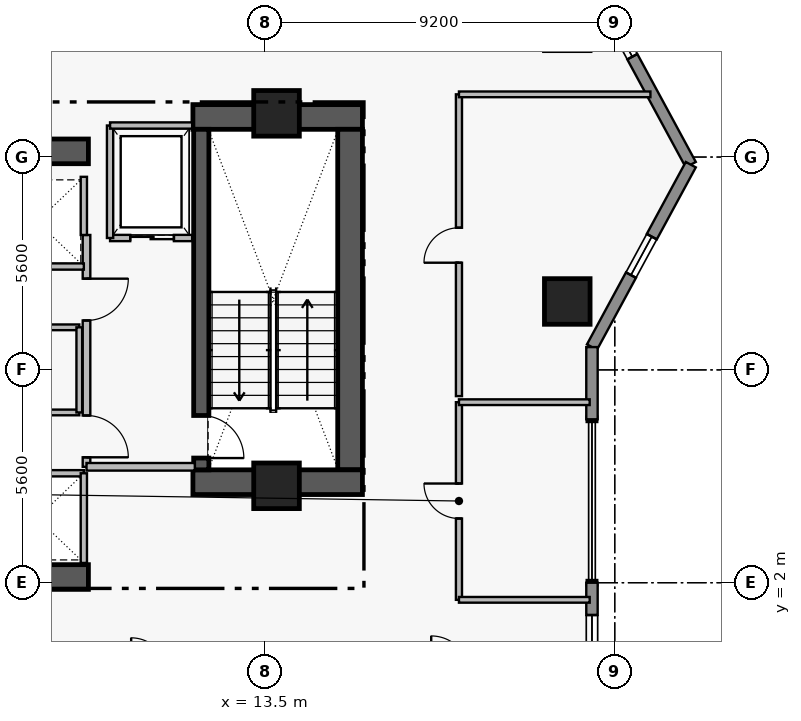
"""IFC4 building model, lengths in metres.
Left out: names, types, materials, properties, quantities, classifications, styles, units other than length and angle.
Written with IfcOpenShell. Run it as: python <this file> out.ifc"""

import sys

from ifc_helpers import new_model, si_unit, direction, frame, frame_2d, origin, origin_2d, place, context, subcontext, project, spatial, rectangle, extrude, element, fill, save


model = new_model("IFC4")
c1 = context("Model", 3, precision=1e-05, world=origin(), true_north=direction((0.0, 1.0)))
c2 = subcontext(c1, "Body", "Model", "MODEL_VIEW")
j1 = project(units=[si_unit("LENGTHUNIT", "METRE"), si_unit("PLANEANGLEUNIT", "RADIAN")], contexts=[c1])
p1 = place(None, origin())
s1 = spatial("IfcSite", under=j1, at=p1, CompositionType="ELEMENT")
p2 = place(p1, origin())
s2 = spatial("IfcBuilding", under=s1, at=p2, CompositionType="ELEMENT")
p3 = place(p2, frame((0.0, 0.0, 192.4)))
s3 = spatial("IfcBuildingStorey", under=s2, at=p3, CompositionType="ELEMENT", Elevation=192.4)
p4 = place(p3, frame((11.6, 14.255, 0.0), z_axis=(0.0, 0.0, 1.0), x_axis=(1.0, 0.0, 0.0)))
e1 = element("IfcWall", 1, at=p4, inside=s3, PredefinedType="SHEAR", context=c2, shape_type="SweptSolid", body=[
    extrude(rectangle(XDim=4.46, YDim=0.65, at=frame_2d((2.23, 0.0))), origin(), (0.0, 0.0, 1.0), 3.56),
])
p5 = place(p3, frame((15.735, 4.97, 0.0), z_axis=(0.0, 0.0, 1.0), x_axis=(0.0, 1.0, 0.0)))
e2 = element("IfcWall", 2, at=p5, inside=s3, PredefinedType="SHEAR", context=c2, shape_type="SweptSolid", body=[
    extrude(rectangle(XDim=8.96, YDim=0.65, at=frame_2d((4.48, 0.0))), origin(), (0.0, 0.0, 1.0), 3.56),
])
p6 = place(p3, frame((11.6, 4.645, 0.0), z_axis=(0.0, 0.0, 1.0), x_axis=(1.0, 0.0, 0.0)))
e3 = element("IfcWall", 3, at=p6, inside=s3, PredefinedType="SHEAR", context=c2, shape_type="SweptSolid", body=[
    extrude(rectangle(XDim=4.46, YDim=0.65, at=frame_2d((2.23, 0.0))), origin(), (0.0, 0.0, 1.0), 3.56),
])
for number, where, z_axis, x_axis in (
    (4, (1.25, 2.15, 0.0), (0.0, 0.0, 1.0), (1.0, 0.0, 0.0)),
    (5, (1.25, 13.35, 0.0), (0.0, 0.0, 1.0), (1.0, 0.0, 0.0)),
):
    element("IfcWall", number, at=place(p3, frame(where, z_axis=z_axis, x_axis=x_axis)), inside=s3, PredefinedType="SHEAR", context=c2, shape_type="SweptSolid", body=[
        extrude(rectangle(XDim=7.6, YDim=0.65, at=frame_2d((3.8, 0.0))), origin(), (0.0, 0.0, 1.0), 3.53),
    ])
p7 = place(p3, frame((11.82, 13.93, 0.0), z_axis=(0.0, 0.0, 1.0), x_axis=(0.0, -1.0, 0.0)))
e6 = element("IfcWall", 6, at=p7, inside=s3, PredefinedType="SHEAR", context=c2, shape_type="SweptSolid", body=[
    extrude(rectangle(XDim=8.96, YDim=0.4, at=frame_2d((4.48, 0.0))), origin(), (0.0, 0.0, 1.0), 3.56),
])
p8 = place(p7, frame((7.53, 0.0, 0.0)))
e7 = element("IfcOpeningElement", 7, at=p8, cuts=e6, PredefinedType="OPENING", context=c2, shape_type="SweptSolid", body=[
    extrude(rectangle(XDim=1.12, YDim=2.22, at=frame_2d((0.56, 1.11))), frame((0.0, 0.21, 0.0), z_axis=(0.0, -1.0, 0.0), x_axis=(1.0, 0.0, 0.0)), (0.0, 0.0, 1.0), 0.42),
])
for number, where, z_axis, x_axis in (
    (8, (13.8, 14.35, 0.0), (0.0, 0.0, 1.0), (1.0, 0.0, 0.0)),
    (9, (13.8, 4.55, 0.0), (0.0, 0.0, 1.0), (1.0, 0.0, 0.0)),
    (10, (21.45, 9.4, 0.0), (0.0, 0.0, 1.0), (1.0, 0.0, 0.0)),
):
    element("IfcColumn", number, at=place(p3, frame(where, z_axis=z_axis, x_axis=x_axis)), inside=s3, PredefinedType="COLUMN", context=c2, shape_type="SweptSolid", body=[
        extrude(rectangle(XDim=1.2, YDim=1.2, at=origin_2d()), origin(), (0.0, 0.0, 1.0), 3.75),
    ])
p9 = place(p3, frame((22.1, 17.8, 0.0), z_axis=(0.0, 0.0, 1.0), x_axis=(0.476258655584, -0.879305233114, 0.0)))
e11 = element("IfcWall", 11, at=p9, inside=s3, PredefinedType="STANDARD", context=c2, shape_type="SweptSolid", body=[
    extrude(rectangle(XDim=5.459, YDim=0.3, at=frame_2d((2.729, 0.0))), origin(), (0.0, 0.0, 1.0), 3.53),
])
p10 = place(p9, frame((1.078, 0.0, 1.25)))
e12 = element("IfcOpeningElement", 12, at=p10, cuts=e11, PredefinedType="OPENING", context=c2, shape_type="SweptSolid", body=[
    extrude(rectangle(XDim=1.15, YDim=1.55, at=frame_2d((0.575, 0.775))), frame((0.0, 0.16, 0.0), z_axis=(0.0, -1.0, 0.0), x_axis=(1.0, 0.0, 0.0)), (0.0, 0.0, 1.0), 0.32),
])
p11 = place(p3, frame((24.7, 13.0, 0.0), z_axis=(0.0, 0.0, 1.0), x_axis=(-0.476258655584, -0.879305233114, 0.0)))
e13 = element("IfcWall", 13, at=p11, inside=s3, PredefinedType="STANDARD", context=c2, shape_type="SweptSolid", body=[
    extrude(rectangle(XDim=5.459, YDim=0.3, at=frame_2d((2.729, 0.0))), origin(), (0.0, 0.0, 1.0), 3.53),
])
p12 = place(p11, frame((2.155, 0.0, 1.25)))
e14 = element("IfcOpeningElement", 14, at=p12, cuts=e13, PredefinedType="OPENING", context=c2, shape_type="SweptSolid", body=[
    extrude(rectangle(XDim=1.15, YDim=1.55, at=frame_2d((0.575, 0.775))), frame((0.0, 0.16, 0.0), z_axis=(0.0, -1.0, 0.0), x_axis=(1.0, 0.0, 0.0)), (0.0, 0.0, 1.0), 0.32),
])
p13 = place(p3, frame((22.1, 8.2, 0.0), z_axis=(0.0, 0.0, 1.0), x_axis=(0.0, -1.0, 0.0)))
e15 = element("IfcWall", 15, at=p13, inside=s3, PredefinedType="STANDARD", context=c2, shape_type="SweptSolid", body=[
    extrude(rectangle(XDim=1.9, YDim=0.3, at=frame_2d((0.95, 0.0))), origin(), (0.0, 0.0, 1.0), 3.53),
])
p14 = place(p3, frame((22.1, 2.0, 0.0), z_axis=(0.0, 0.0, 1.0), x_axis=(0.0, -1.0, 0.0)))
e16 = element("IfcWall", 16, at=p14, inside=s3, PredefinedType="STANDARD", context=c2, shape_type="SweptSolid", body=[
    extrude(rectangle(XDim=2.85, YDim=0.3, at=frame_2d((1.425, 0.0))), origin(), (0.0, 0.0, 1.0), 3.53),
])
p15 = place(p14, frame((0.85, 0.0, 0.95)))
e17 = element("IfcOpeningElement", 17, at=p15, cuts=e16, PredefinedType="OPENING", context=c2, shape_type="SweptSolid", body=[
    extrude(rectangle(XDim=1.15, YDim=1.55, at=frame_2d((0.575, 0.775))), frame((0.0, 0.16, 0.0), z_axis=(0.0, -1.0, 0.0), x_axis=(1.0, 0.0, 0.0)), (0.0, 0.0, 1.0), 0.32),
])
p16 = place(p3, frame((8.8, 11.15, 0.0), z_axis=(0.0, 0.0, 1.0), x_axis=(0.0, -1.0, 0.0)))
e18 = element("IfcWall", 18, at=p16, inside=s3, PredefinedType="PARTITIONING", context=c2, shape_type="SweptSolid", body=[
    extrude(rectangle(XDim=6.1, YDim=0.2, at=frame_2d((3.05, 0.0))), origin(), (0.0, 0.0, 1.0), 3.53),
])
p17 = place(p16, frame((1.15, 0.0, 0.0)))
e19 = element("IfcOpeningElement", 19, at=p17, cuts=e18, PredefinedType="OPENING", context=c2, shape_type="SweptSolid", body=[
    extrude(rectangle(XDim=1.1, YDim=2.2, at=frame_2d((0.55, 1.1))), frame((0.0, 0.11, 0.0), z_axis=(0.0, -1.0, 0.0), x_axis=(1.0, 0.0, 0.0)), (0.0, 0.0, 1.0), 0.22),
])
p18 = place(p16, frame((4.75, 0.0, 0.0)))
e20 = element("IfcOpeningElement", 20, at=p18, cuts=e18, PredefinedType="OPENING", context=c2, shape_type="SweptSolid", body=[
    extrude(rectangle(XDim=1.1, YDim=2.2, at=frame_2d((0.55, 1.1))), frame((0.0, 0.11, 0.0), z_axis=(0.0, -1.0, 0.0), x_axis=(1.0, 0.0, 0.0)), (0.0, 0.0, 1.0), 0.22),
])
p19 = place(p3, frame((9.42, 11.07, 0.0), z_axis=(0.0, 0.0, 1.0), x_axis=(1.0, 0.0, 0.0)))
e21 = element("IfcWall", 21, at=p19, inside=s3, PredefinedType="PARTITIONING", context=c2, shape_type="SweptSolid", body=[
    extrude(rectangle(XDim=2.16, YDim=0.165, at=frame_2d((1.08, 0.0))), origin(), (0.0, 0.0, 1.0), 3.53),
])
p20 = place(p19, frame((0.53, 0.0, 0.0)))
e22 = element("IfcOpeningElement", 22, at=p20, cuts=e21, PredefinedType="OPENING", context=c2, shape_type="SweptSolid", body=[
    extrude(rectangle(XDim=1.15, YDim=2.25, at=frame_2d((0.575, 1.125))), frame((0.0, 0.093, 0.0), z_axis=(0.0, -1.0, 0.0), x_axis=(1.0, 0.0, 0.0)), (0.0, 0.0, 1.0), 0.185),
])
p21 = place(p3, frame((6.14, 8.72, 0.0), z_axis=(0.0, 0.0, 1.0), x_axis=(1.0, 0.0, 0.0)))
e23 = element("IfcWall", 23, at=p21, inside=s3, PredefinedType="PARTITIONING", context=c2, shape_type="SweptSolid", body=[
    extrude(rectangle(XDim=2.47, YDim=0.15, at=frame_2d((1.235, 0.0))), origin(), (0.0, 0.0, 1.0), 3.53),
])
p22 = place(p21, frame((0.785, 0.0, 0.0)))
e24 = element("IfcOpeningElement", 24, at=p22, cuts=e23, PredefinedType="OPENING", context=c2, shape_type="SweptSolid", body=[
    extrude(rectangle(XDim=0.9, YDim=2.15, at=frame_2d((0.45, 1.075))), frame((0.0, 0.085, 0.0), z_axis=(0.0, -1.0, 0.0), x_axis=(1.0, 0.0, 0.0)), (0.0, 0.0, 1.0), 0.17),
])
p23 = place(p3, frame((18.6, 1.55, 0.0), z_axis=(0.0, 0.0, 1.0), x_axis=(0.0, 1.0, 0.0)))
e25 = element("IfcWall", 25, at=p23, inside=s3, PredefinedType="PARTITIONING", context=c2, shape_type="SweptSolid", body=[
    extrude(rectangle(XDim=5.2, YDim=0.16, at=frame_2d((2.6, 0.0))), origin(), (0.0, 0.0, 1.0), 3.53),
])
p24 = place(p23, frame((2.14, 0.0, 0.0)))
e26 = element("IfcOpeningElement", 26, at=p24, cuts=e25, PredefinedType="OPENING", context=c2, shape_type="SweptSolid", body=[
    extrude(rectangle(XDim=0.92, YDim=2.12, at=frame_2d((0.46, 1.06))), frame((0.0, 0.09, 0.0), z_axis=(0.0, -1.0, 0.0), x_axis=(1.0, 0.0, 0.0)), (0.0, 0.0, 1.0), 0.18),
])
p25 = place(p3, frame((18.6, 6.91, 0.0), z_axis=(0.0, 0.0, 1.0), x_axis=(0.0, 1.0, 0.0)))
e27 = element("IfcWall", 27, at=p25, inside=s3, PredefinedType="PARTITIONING", context=c2, shape_type="SweptSolid", body=[
    extrude(rectangle(XDim=7.94, YDim=0.16, at=frame_2d((3.97, 0.0))), origin(), (0.0, 0.0, 1.0), 3.53),
])
p26 = place(p25, frame((3.51, 0.0, 0.0)))
e28 = element("IfcOpeningElement", 28, at=p26, cuts=e27, PredefinedType="OPENING", context=c2, shape_type="SweptSolid", body=[
    extrude(rectangle(XDim=0.92, YDim=2.12, at=frame_2d((0.46, 1.06))), frame((0.0, 0.09, 0.0), z_axis=(0.0, -1.0, 0.0), x_axis=(1.0, 0.0, 0.0)), (0.0, 0.0, 1.0), 0.18),
])
p27 = place(p3, frame((8.8, 5.05, 0.0), z_axis=(0.0, 0.0, 1.0), x_axis=(1.0, 0.0, 0.0)))
e29 = element("IfcWall", 29, at=p27, inside=s3, PredefinedType="PARTITIONING", context=c2, shape_type="SweptSolid", body=[
    extrude(rectangle(XDim=2.85, YDim=0.2, at=frame_2d((1.425, 0.0))), origin(), (0.0, 0.0, 1.0), 3.53),
])
p28 = place(p3, frame((9.42, 11.07, 0.0), z_axis=(0.0, 0.0, 1.0), x_axis=(0.0, 1.0, 0.0)))
e30 = element("IfcWall", 30, at=p28, inside=s3, PredefinedType="PARTITIONING", context=c2, shape_type="SweptSolid", body=[
    extrude(rectangle(XDim=2.96, YDim=0.165, at=frame_2d((1.48, 0.0))), origin(), (0.0, 0.0, 1.0), 3.53),
])
p29 = place(p3, frame((9.42, 14.03, 0.0), z_axis=(0.0, 0.0, 1.0), x_axis=(1.0, 0.0, 0.0)))
e31 = element("IfcWall", 31, at=p29, inside=s3, PredefinedType="PARTITIONING", context=c2, shape_type="SweptSolid", body=[
    extrude(rectangle(XDim=2.16, YDim=0.165, at=frame_2d((1.08, 0.0))), origin(), (0.0, 0.0, 1.0), 3.53),
])
p30 = place(p3, frame((6.25, 4.88, 0.0), z_axis=(0.0, 0.0, 1.0), x_axis=(1.0, 0.0, 0.0)))
e32 = element("IfcWall", 32, at=p30, inside=s3, PredefinedType="PARTITIONING", context=c2, shape_type="SweptSolid", body=[
    extrude(rectangle(XDim=2.48, YDim=0.165, at=frame_2d((1.24, 0.0))), origin(), (0.0, 0.0, 1.0), 3.53),
])
p31 = place(p3, frame((8.73, 2.52, 0.0), z_axis=(0.0, 0.0, 1.0), x_axis=(0.0, 1.0, 0.0)))
e33 = element("IfcWall", 33, at=p31, inside=s3, PredefinedType="PARTITIONING", context=c2, shape_type="SweptSolid", body=[
    extrude(rectangle(XDim=2.36, YDim=0.165, at=frame_2d((1.18, 0.0))), origin(), (0.0, 0.0, 1.0), 3.53),
])
p32 = place(p3, frame((6.25, 10.32, 0.0), z_axis=(0.0, 0.0, 1.0), x_axis=(1.0, 0.0, 0.0)))
e34 = element("IfcWall", 34, at=p32, inside=s3, PredefinedType="PARTITIONING", context=c2, shape_type="SweptSolid", body=[
    extrude(rectangle(XDim=2.48, YDim=0.165, at=frame_2d((1.24, 0.0))), origin(), (0.0, 0.0, 1.0), 3.53),
])
p33 = place(p3, frame((8.73, 11.15, 0.0), z_axis=(0.0, 0.0, 1.0), x_axis=(0.0, 1.0, 0.0)))
e35 = element("IfcWall", 35, at=p33, inside=s3, PredefinedType="PARTITIONING", context=c2, shape_type="SweptSolid", body=[
    extrude(rectangle(XDim=1.53, YDim=0.165, at=frame_2d((0.765, 0.0))), origin(), (0.0, 0.0, 1.0), 3.53),
])
p34 = place(p3, frame((6.14, 6.48, 0.0), z_axis=(0.0, 0.0, 1.0), x_axis=(1.0, 0.0, 0.0)))
e36 = element("IfcWall", 36, at=p34, inside=s3, PredefinedType="PARTITIONING", context=c2, shape_type="SweptSolid", body=[
    extrude(rectangle(XDim=2.47, YDim=0.15, at=frame_2d((1.235, 0.0))), origin(), (0.0, 0.0, 1.0), 3.53),
])
p35 = place(p3, frame((8.61, 6.48, 0.0), z_axis=(0.0, 0.0, 1.0), x_axis=(0.0, 1.0, 0.0)))
e37 = element("IfcWall", 37, at=p35, inside=s3, PredefinedType="PARTITIONING", context=c2, shape_type="SweptSolid", body=[
    extrude(rectangle(XDim=2.24, YDim=0.15, at=frame_2d((1.12, 0.0))), origin(), (0.0, 0.0, 1.0), 3.53),
])
for number, where, z_axis, x_axis in (
    (38, (18.6, 1.55, 0.0), (0.0, 0.0, 1.0), (1.0, 0.0, 0.0)),
    (39, (18.6, 6.75, 0.0), (0.0, 0.0, 1.0), (1.0, 0.0, 0.0)),
):
    element("IfcWall", number, at=place(p3, frame(where, z_axis=z_axis, x_axis=x_axis)), inside=s3, PredefinedType="PARTITIONING", context=c2, shape_type="SweptSolid", body=[
        extrude(rectangle(XDim=3.44, YDim=0.15, at=frame_2d((1.72, 0.0))), origin(), (0.0, 0.0, 1.0), 3.53),
    ])
p36 = place(p3, frame((18.6, 14.85, 0.0), z_axis=(0.0, 0.0, 1.0), x_axis=(1.0, 0.0, 0.0)))
e40 = element("IfcWall", 40, at=p36, inside=s3, PredefinedType="PARTITIONING", context=c2, shape_type="SweptSolid", body=[
    extrude(rectangle(XDim=5.038, YDim=0.15, at=frame_2d((2.519, 0.0))), origin(), (0.0, 0.0, 1.0), 3.53),
])
p37 = place(p10, origin())
e41 = element("IfcWindow", 41, at=p37, inside=s3, PartitioningType="SINGLE_PANEL", PredefinedType="WINDOW", context=c2, shape_type="SweptSolid", body=[
    extrude(rectangle(XDim=1.15, YDim=1.55, at=frame_2d((0.575, 0.775))), frame((0.0, 0.03, 0.0), z_axis=(0.0, -1.0, 0.0), x_axis=(1.0, 0.0, 0.0)), (0.0, 0.0, 1.0), 0.06),
])
fill(e12, e41)
p38 = place(p12, origin())
e42 = element("IfcWindow", 42, at=p38, inside=s3, PartitioningType="SINGLE_PANEL", PredefinedType="WINDOW", context=c2, shape_type="SweptSolid", body=[
    extrude(rectangle(XDim=1.15, YDim=1.55, at=frame_2d((0.575, 0.775))), frame((0.0, 0.03, 0.0), z_axis=(0.0, -1.0, 0.0), x_axis=(1.0, 0.0, 0.0)), (0.0, 0.0, 1.0), 0.06),
])
fill(e14, e42)
p39 = place(p15, origin())
e43 = element("IfcWindow", 43, at=p39, inside=s3, PartitioningType="SINGLE_PANEL", PredefinedType="WINDOW", context=c2, shape_type="SweptSolid", body=[
    extrude(rectangle(XDim=1.15, YDim=1.55, at=frame_2d((0.575, 0.775))), frame((0.0, 0.03, 0.0), z_axis=(0.0, -1.0, 0.0), x_axis=(1.0, 0.0, 0.0)), (0.0, 0.0, 1.0), 0.06),
])
fill(e17, e43)
p40 = place(p8, origin())
e44 = element("IfcDoor", 44, at=p40, inside=s3, OperationType="SINGLE_SWING_RIGHT", PredefinedType="DOOR", context=c2, shape_type="SweptSolid", body=[
    extrude(rectangle(XDim=1.12, YDim=2.22, at=frame_2d((0.56, 1.11))), frame((0.0, 0.025, 0.0), z_axis=(0.0, -1.0, 0.0), x_axis=(1.0, 0.0, 0.0)), (0.0, 0.0, 1.0), 0.05),
])
fill(e7, e44)
p41 = place(p17, origin())
e45 = element("IfcDoor", 45, at=p41, inside=s3, OperationType="SINGLE_SWING_LEFT", PredefinedType="DOOR", context=c2, shape_type="SweptSolid", body=[
    extrude(rectangle(XDim=1.1, YDim=2.2, at=frame_2d((0.55, 1.1))), frame((0.0, 0.025, 0.0), z_axis=(0.0, -1.0, 0.0), x_axis=(1.0, 0.0, 0.0)), (0.0, 0.0, 1.0), 0.05),
])
fill(e19, e45)
p42 = place(p18, origin())
e46 = element("IfcDoor", 46, at=p42, inside=s3, OperationType="SINGLE_SWING_RIGHT", PredefinedType="DOOR", context=c2, shape_type="SweptSolid", body=[
    extrude(rectangle(XDim=1.1, YDim=2.2, at=frame_2d((0.55, 1.1))), frame((0.0, 0.025, 0.0), z_axis=(0.0, -1.0, 0.0), x_axis=(1.0, 0.0, 0.0)), (0.0, 0.0, 1.0), 0.05),
])
fill(e20, e46)
p43 = place(p20, origin())
e47 = element("IfcDoor", 47, at=p43, inside=s3, OperationType="SLIDING_TO_LEFT", PredefinedType="DOOR", context=c2, shape_type="SweptSolid", body=[
    extrude(rectangle(XDim=1.15, YDim=2.25, at=frame_2d((0.575, 1.125))), frame((0.0, 0.025, 0.0), z_axis=(0.0, -1.0, 0.0), x_axis=(1.0, 0.0, 0.0)), (0.0, 0.0, 1.0), 0.05),
])
fill(e22, e47)
p44 = place(p24, origin())
e48 = element("IfcDoor", 48, at=p44, inside=s3, OperationType="SINGLE_SWING_RIGHT", PredefinedType="DOOR", context=c2, shape_type="SweptSolid", body=[
    extrude(rectangle(XDim=0.92, YDim=2.12, at=frame_2d((0.46, 1.06))), frame((0.0, 0.025, 0.0), z_axis=(0.0, -1.0, 0.0), x_axis=(1.0, 0.0, 0.0)), (0.0, 0.0, 1.0), 0.05),
])
fill(e26, e48)
p45 = place(p26, origin())
e49 = element("IfcDoor", 49, at=p45, inside=s3, OperationType="SINGLE_SWING_LEFT", PredefinedType="DOOR", context=c2, shape_type="SweptSolid", body=[
    extrude(rectangle(XDim=0.92, YDim=2.12, at=frame_2d((0.46, 1.06))), frame((0.0, 0.025, 0.0), z_axis=(0.0, -1.0, 0.0), x_axis=(1.0, 0.0, 0.0)), (0.0, 0.0, 1.0), 0.05),
])
fill(e28, e49)
save(model, sys.argv[1])
